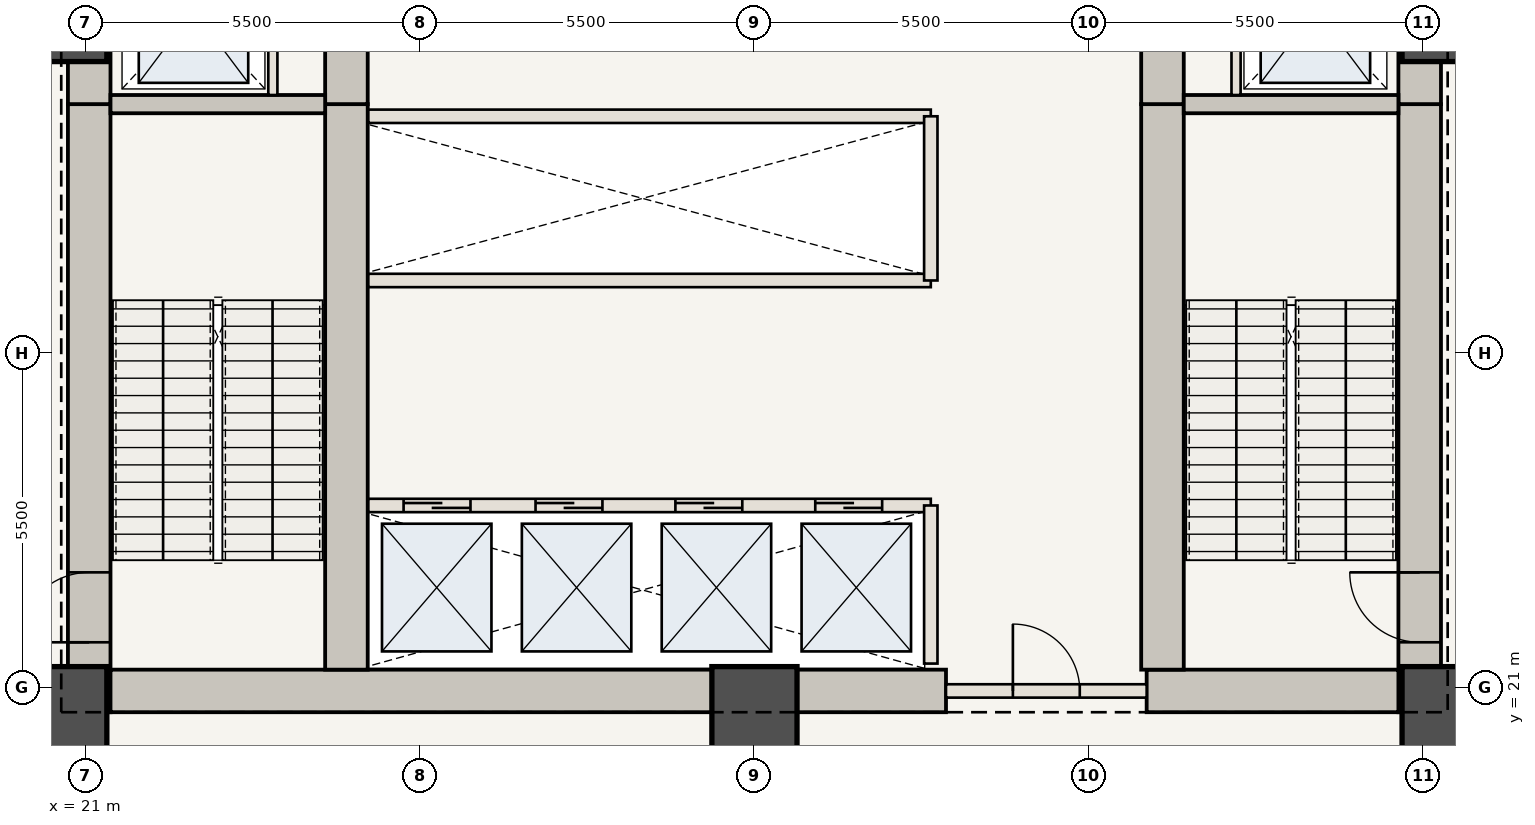
"""IFC4 building model, lengths in metres.
Left out: names, types, materials, properties, quantities, classifications, styles, units other than length and angle.
Written with IfcOpenShell. Run it as: python <this file> out.ifc"""

import sys

from ifc_helpers import new_model, si_unit, direction, frame, frame_2d, origin, origin_2d, place, context, subcontext, project, spatial, rectangle, extrude, element, fill, save


model = new_model("IFC4")
c1 = context("Model", 3, precision=1e-05, world=origin(), true_north=direction((0.0, 1.0)))
c2 = subcontext(c1, "Body", "Model", "MODEL_VIEW")
j1 = project(units=[si_unit("LENGTHUNIT", "METRE"), si_unit("PLANEANGLEUNIT", "RADIAN")], contexts=[c1])
p1 = place(None, origin())
s1 = spatial("IfcSite", under=j1, at=p1, CompositionType="ELEMENT")
p2 = place(p1, origin())
s2 = spatial("IfcBuilding", under=s1, at=p2, CompositionType="ELEMENT")
p3 = place(p2, frame((0.0, 0.0, 6.65)))
s3 = spatial("IfcBuildingStorey", under=s2, at=p3, CompositionType="ELEMENT", Elevation=6.65)
p4 = place(p3, frame((21.06, 20.6, 0.0), z_axis=(0.0, 0.0, 1.0), x_axis=(0.0, 1.0, 0.0)))
e1 = element("IfcWall", 1, at=p4, inside=s3, PredefinedType="SHEAR", context=c2, shape_type="SweptSolid", body=[
    extrude(rectangle(XDim=10.0, YDim=0.7, at=frame_2d((5.0, 0.0))), origin(), (0.0, 0.0, 1.0), 5.6),
])
p5 = place(p4, frame((1.15, 0.0, 0.0)))
e2 = element("IfcOpeningElement", 2, at=p5, cuts=e1, PredefinedType="OPENING", context=c2, shape_type="SweptSolid", body=[
    extrude(rectangle(XDim=1.15, YDim=2.15, at=frame_2d((0.575, 1.075))), frame((0.0, 0.36, 0.0), z_axis=(0.0, -1.0, 0.0), x_axis=(1.0, 0.0, 0.0)), (0.0, 0.0, 1.0), 0.72),
])
p6 = place(p3, frame((21.06, 30.6, 0.0), z_axis=(0.0, 0.0, 1.0), x_axis=(0.0, 1.0, 0.0)))
e3 = element("IfcWall", 3, at=p6, inside=s3, PredefinedType="SHEAR", context=c2, shape_type="SweptSolid", body=[
    extrude(rectangle(XDim=12.75, YDim=0.7, at=frame_2d((6.375, 0.0))), origin(), (0.0, 0.0, 1.0), 5.6),
])
p7 = place(p6, frame((4.2, 0.0, 0.0)))
e4 = element("IfcOpeningElement", 4, at=p7, cuts=e3, PredefinedType="OPENING", context=c2, shape_type="SweptSolid", body=[
    extrude(rectangle(XDim=1.1, YDim=2.15, at=frame_2d((0.55, 1.075))), frame((0.0, 0.36, 0.0), z_axis=(0.0, -1.0, 0.0), x_axis=(1.0, 0.0, 0.0)), (0.0, 0.0, 1.0), 0.72),
])
p8 = place(p6, frame((9.2, 0.0, 0.0)))
e5 = element("IfcOpeningElement", 5, at=p8, cuts=e3, PredefinedType="OPENING", context=c2, shape_type="SweptSolid", body=[
    extrude(rectangle(XDim=0.92, YDim=2.1, at=frame_2d((0.46, 1.05))), frame((0.0, 0.36, 0.0), z_axis=(0.0, -1.0, 0.0), x_axis=(1.0, 0.0, 0.0)), (0.0, 0.0, 1.0), 0.72),
])
p9 = place(p3, frame((42.94, 20.6, 0.0), z_axis=(0.0, 0.0, 1.0), x_axis=(0.0, 1.0, 0.0)))
e6 = element("IfcWall", 6, at=p9, inside=s3, PredefinedType="SHEAR", context=c2, shape_type="SweptSolid", body=[
    extrude(rectangle(XDim=10.0, YDim=0.7, at=frame_2d((5.0, 0.0))), origin(), (0.0, 0.0, 1.0), 5.6),
])
p10 = place(p9, frame((1.15, 0.0, 0.0)))
e7 = element("IfcOpeningElement", 7, at=p10, cuts=e6, PredefinedType="OPENING", context=c2, shape_type="SweptSolid", body=[
    extrude(rectangle(XDim=1.15, YDim=2.15, at=frame_2d((0.575, 1.075))), frame((0.0, 0.36, 0.0), z_axis=(0.0, -1.0, 0.0), x_axis=(1.0, 0.0, 0.0)), (0.0, 0.0, 1.0), 0.72),
])
p11 = place(p3, frame((42.94, 30.6, 0.0), z_axis=(0.0, 0.0, 1.0), x_axis=(0.0, 1.0, 0.0)))
e8 = element("IfcWall", 8, at=p11, inside=s3, PredefinedType="SHEAR", context=c2, shape_type="SweptSolid", body=[
    extrude(rectangle(XDim=12.75, YDim=0.7, at=frame_2d((6.375, 0.0))), origin(), (0.0, 0.0, 1.0), 5.6),
])
p12 = place(p11, frame((4.2, 0.0, 0.0)))
e9 = element("IfcOpeningElement", 9, at=p12, cuts=e8, PredefinedType="OPENING", context=c2, shape_type="SweptSolid", body=[
    extrude(rectangle(XDim=1.1, YDim=2.15, at=frame_2d((0.55, 1.075))), frame((0.0, 0.36, 0.0), z_axis=(0.0, -1.0, 0.0), x_axis=(1.0, 0.0, 0.0)), (0.0, 0.0, 1.0), 0.72),
])
p13 = place(p11, frame((8.4, 0.0, 0.0)))
e10 = element("IfcOpeningElement", 10, at=p13, cuts=e8, PredefinedType="OPENING", context=c2, shape_type="SweptSolid", body=[
    extrude(rectangle(XDim=0.88, YDim=2.1, at=frame_2d((0.44, 1.05))), frame((0.0, 0.36, 0.0), z_axis=(0.0, -1.0, 0.0), x_axis=(1.0, 0.0, 0.0)), (0.0, 0.0, 1.0), 0.72),
])
p14 = place(p11, frame((10.5, 0.0, 0.0)))
e11 = element("IfcOpeningElement", 11, at=p14, cuts=e8, PredefinedType="OPENING", context=c2, shape_type="SweptSolid", body=[
    extrude(rectangle(XDim=0.88, YDim=2.1, at=frame_2d((0.44, 1.05))), frame((0.0, 0.36, 0.0), z_axis=(0.0, -1.0, 0.0), x_axis=(1.0, 0.0, 0.0)), (0.0, 0.0, 1.0), 0.72),
])
p15 = place(p3, frame((21.41, 20.95, 0.0), z_axis=(0.0, 0.0, 1.0), x_axis=(1.0, 0.0, 0.0)))
e12 = element("IfcWall", 12, at=p15, inside=s3, PredefinedType="SHEAR", context=c2, shape_type="SweptSolid", body=[
    extrude(rectangle(XDim=13.74, YDim=0.7, at=frame_2d((6.87, 0.0))), origin(), (0.0, 0.0, 1.0), 5.6),
])
p16 = place(p3, frame((38.45, 20.95, 0.0), z_axis=(0.0, 0.0, 1.0), x_axis=(1.0, 0.0, 0.0)))
e13 = element("IfcWall", 13, at=p16, inside=s3, PredefinedType="SHEAR", context=c2, shape_type="SweptSolid", body=[
    extrude(rectangle(XDim=4.14, YDim=0.7, at=frame_2d((2.07, 0.0))), origin(), (0.0, 0.0, 1.0), 5.6),
])
p17 = place(p3, frame((25.29, 21.3, 0.0), z_axis=(0.0, 0.0, 1.0), x_axis=(0.0, 1.0, 0.0)))
e14 = element("IfcWall", 14, at=p17, inside=s3, PredefinedType="SHEAR", context=c2, shape_type="SweptSolid", body=[
    extrude(rectangle(XDim=9.3, YDim=0.7, at=frame_2d((4.65, 0.0))), origin(), (0.0, 0.0, 1.0), 5.6),
])
p18 = place(p3, frame((25.29, 30.6, 0.0), z_axis=(0.0, 0.0, 1.0), x_axis=(0.0, 1.0, 0.0)))
e15 = element("IfcWall", 15, at=p18, inside=s3, PredefinedType="SHEAR", context=c2, shape_type="SweptSolid", body=[
    extrude(rectangle(XDim=12.05, YDim=0.7, at=frame_2d((6.025, 0.0))), origin(), (0.0, 0.0, 1.0), 5.6),
])
p19 = place(p18, frame((6.25, 0.0, 0.0)))
e16 = element("IfcOpeningElement", 16, at=p19, cuts=e15, PredefinedType="OPENING", context=c2, shape_type="SweptSolid", body=[
    extrude(rectangle(XDim=1.1, YDim=2.15, at=frame_2d((0.55, 1.075))), frame((0.0, 0.36, 0.0), z_axis=(0.0, -1.0, 0.0), x_axis=(1.0, 0.0, 0.0)), (0.0, 0.0, 1.0), 0.72),
])
p20 = place(p3, frame((38.71, 21.3, 0.0), z_axis=(0.0, 0.0, 1.0), x_axis=(0.0, 1.0, 0.0)))
e17 = element("IfcWall", 17, at=p20, inside=s3, PredefinedType="SHEAR", context=c2, shape_type="SweptSolid", body=[
    extrude(rectangle(XDim=9.3, YDim=0.7, at=frame_2d((4.65, 0.0))), origin(), (0.0, 0.0, 1.0), 5.6),
])
p21 = place(p3, frame((38.71, 30.6, 0.0), z_axis=(0.0, 0.0, 1.0), x_axis=(0.0, 1.0, 0.0)))
e18 = element("IfcWall", 18, at=p21, inside=s3, PredefinedType="SHEAR", context=c2, shape_type="SweptSolid", body=[
    extrude(rectangle(XDim=12.05, YDim=0.7, at=frame_2d((6.025, 0.0))), origin(), (0.0, 0.0, 1.0), 5.6),
])
for number, where, z_axis, x_axis in (
    (19, (20.65, 20.65, 0.0), (0.0, 0.0, 1.0), (1.0, 0.0, 0.0)),
    (20, (32.0, 20.65, 0.0), (0.0, 0.0, 1.0), (1.0, 0.0, 0.0)),
    (21, (43.35, 20.65, 0.0), (0.0, 0.0, 1.0), (1.0, 0.0, 0.0)),
    (22, (43.35, 32.0, 0.0), (0.0, 0.0, 1.0), (1.0, 0.0, 0.0)),
    (23, (20.65, 32.0, 0.0), (0.0, 0.0, 1.0), (1.0, 0.0, 0.0)),
):
    element("IfcColumn", number, at=place(p3, frame(where, z_axis=z_axis, x_axis=x_axis)), inside=s3, PredefinedType="COLUMN", context=c2, shape_type="SweptSolid", body=[
        extrude(rectangle(XDim=1.4, YDim=1.4, at=origin_2d()), origin(), (0.0, 0.0, 1.0), 5.6),
    ])
for number, where, z_axis, x_axis in (
    (24, (21.41, 30.6, 0.0), (0.0, 0.0, 1.0), (1.0, 0.0, 0.0)),
    (25, (39.06, 30.6, 0.0), (0.0, 0.0, 1.0), (1.0, 0.0, 0.0)),
):
    element("IfcWall", number, at=place(p3, frame(where, z_axis=z_axis, x_axis=x_axis)), inside=s3, PredefinedType="SHEAR", context=c2, shape_type="SweptSolid", body=[
        extrude(rectangle(XDim=3.53, YDim=0.3, at=frame_2d((1.765, 0.0))), origin(), (0.0, 0.0, 1.0), 5.36),
    ])
for number, where, z_axis, x_axis in (
    (26, (24.08, 30.75, 0.0), (0.0, 0.0, 1.0), (0.0, 1.0, 0.0)),
    (27, (39.92, 30.75, 0.0), (0.0, 0.0, 1.0), (0.0, 1.0, 0.0)),
):
    element("IfcWall", number, at=place(p3, frame(where, z_axis=z_axis, x_axis=x_axis)), inside=s3, PredefinedType="STANDARD", context=c2, shape_type="SweptSolid", body=[
        extrude(rectangle(XDim=2.65, YDim=0.15, at=frame_2d((1.325, 0.0))), origin(), (0.0, 0.0, 1.0), 5.36),
    ])
p22 = place(p3, frame((35.15, 20.95, 0.0), z_axis=(0.0, 0.0, 1.0), x_axis=(1.0, 0.0, 0.0)))
e28 = element("IfcWall", 28, at=p22, inside=s3, PredefinedType="STANDARD", context=c2, shape_type="SweptSolid", body=[
    extrude(rectangle(XDim=3.3, YDim=0.22, at=frame_2d((1.65, 0.0))), origin(), (0.0, 0.0, 1.0), 5.36),
])
p23 = place(p22, frame((1.1, 0.0, 0.0)))
e29 = element("IfcOpeningElement", 29, at=p23, cuts=e28, PredefinedType="OPENING", context=c2, shape_type="SweptSolid", body=[
    extrude(rectangle(XDim=1.1, YDim=2.15, at=frame_2d((0.55, 1.075))), frame((0.0, 0.12, 0.0), z_axis=(0.0, -1.0, 0.0), x_axis=(1.0, 0.0, 0.0)), (0.0, 0.0, 1.0), 0.24),
])
p24 = place(p3, frame((25.65, 24.0, 0.0), z_axis=(0.0, 0.0, 1.0), x_axis=(1.0, 0.0, 0.0)))
e30 = element("IfcWall", 30, at=p24, inside=s3, PredefinedType="STANDARD", context=c2, shape_type="SweptSolid", body=[
    extrude(rectangle(XDim=9.25, YDim=0.22, at=frame_2d((4.625, 0.0))), origin(), (0.0, 0.0, 1.0), 5.36),
])
p25 = place(p24, frame((0.58, 0.0, 0.0)))
e31 = element("IfcOpeningElement", 31, at=p25, cuts=e30, PredefinedType="OPENING", context=c2, shape_type="SweptSolid", body=[
    extrude(rectangle(XDim=1.1, YDim=2.15, at=frame_2d((0.55, 1.075))), frame((0.0, 0.12, 0.0), z_axis=(0.0, -1.0, 0.0), x_axis=(1.0, 0.0, 0.0)), (0.0, 0.0, 1.0), 0.24),
])
p26 = place(p24, frame((2.75, 0.0, 0.0)))
e32 = element("IfcOpeningElement", 32, at=p26, cuts=e30, PredefinedType="OPENING", context=c2, shape_type="SweptSolid", body=[
    extrude(rectangle(XDim=1.1, YDim=2.15, at=frame_2d((0.55, 1.075))), frame((0.0, 0.12, 0.0), z_axis=(0.0, -1.0, 0.0), x_axis=(1.0, 0.0, 0.0)), (0.0, 0.0, 1.0), 0.24),
])
p27 = place(p24, frame((5.05, 0.0, 0.0)))
e33 = element("IfcOpeningElement", 33, at=p27, cuts=e30, PredefinedType="OPENING", context=c2, shape_type="SweptSolid", body=[
    extrude(rectangle(XDim=1.1, YDim=2.15, at=frame_2d((0.55, 1.075))), frame((0.0, 0.12, 0.0), z_axis=(0.0, -1.0, 0.0), x_axis=(1.0, 0.0, 0.0)), (0.0, 0.0, 1.0), 0.24),
])
p28 = place(p24, frame((7.35, 0.0, 0.0)))
e34 = element("IfcOpeningElement", 34, at=p28, cuts=e30, PredefinedType="OPENING", context=c2, shape_type="SweptSolid", body=[
    extrude(rectangle(XDim=1.1, YDim=2.15, at=frame_2d((0.55, 1.075))), frame((0.0, 0.12, 0.0), z_axis=(0.0, -1.0, 0.0), x_axis=(1.0, 0.0, 0.0)), (0.0, 0.0, 1.0), 0.24),
])
p29 = place(p3, frame((34.9, 21.4, 0.0), z_axis=(0.0, 0.0, 1.0), x_axis=(0.0, 1.0, 0.0)))
e35 = element("IfcWall", 35, at=p29, inside=s3, PredefinedType="STANDARD", context=c2, shape_type="SweptSolid", body=[
    extrude(rectangle(XDim=2.6, YDim=0.22, at=frame_2d((1.3, 0.0))), origin(), (0.0, 0.0, 1.0), 5.36),
])
for number, where, z_axis, x_axis in (
    (36, (25.65, 27.7, 0.0), (0.0, 0.0, 1.0), (1.0, 0.0, 0.0)),
    (37, (25.65, 30.4, 0.0), (0.0, 0.0, 1.0), (1.0, 0.0, 0.0)),
):
    element("IfcWall", number, at=place(p3, frame(where, z_axis=z_axis, x_axis=x_axis)), inside=s3, PredefinedType="STANDARD", context=c2, shape_type="SweptSolid", body=[
        extrude(rectangle(XDim=9.25, YDim=0.22, at=frame_2d((4.625, 0.0))), origin(), (0.0, 0.0, 1.0), 5.36),
    ])
p30 = place(p3, frame((34.9, 27.7, 0.0), z_axis=(0.0, 0.0, 1.0), x_axis=(0.0, 1.0, 0.0)))
e38 = element("IfcWall", 38, at=p30, inside=s3, PredefinedType="STANDARD", context=c2, shape_type="SweptSolid", body=[
    extrude(rectangle(XDim=2.7, YDim=0.22, at=frame_2d((1.35, 0.0))), origin(), (0.0, 0.0, 1.0), 5.36),
])
p31 = place(p5, origin())
e39 = element("IfcDoor", 39, at=p31, inside=s3, OperationType="SINGLE_SWING_LEFT", PredefinedType="DOOR", context=c2, shape_type="SweptSolid", body=[
    extrude(rectangle(XDim=1.15, YDim=2.15, at=frame_2d((0.575, 1.075))), frame((0.0, 0.025, 0.0), z_axis=(0.0, -1.0, 0.0), x_axis=(1.0, 0.0, 0.0)), (0.0, 0.0, 1.0), 0.05),
])
fill(e2, e39)
p32 = place(p10, origin())
e40 = element("IfcDoor", 40, at=p32, inside=s3, OperationType="SINGLE_SWING_RIGHT", PredefinedType="DOOR", context=c2, shape_type="SweptSolid", body=[
    extrude(rectangle(XDim=1.15, YDim=2.15, at=frame_2d((0.575, 1.075))), frame((0.0, 0.025, 0.0), z_axis=(0.0, -1.0, 0.0), x_axis=(1.0, 0.0, 0.0)), (0.0, 0.0, 1.0), 0.05),
])
fill(e7, e40)
p33 = place(p23, origin())
e41 = element("IfcDoor", 41, at=p33, inside=s3, OperationType="SINGLE_SWING_LEFT", PredefinedType="DOOR", context=c2, shape_type="SweptSolid", body=[
    extrude(rectangle(XDim=1.1, YDim=2.15, at=frame_2d((0.55, 1.075))), frame((0.0, 0.025, 0.0), z_axis=(0.0, -1.0, 0.0), x_axis=(1.0, 0.0, 0.0)), (0.0, 0.0, 1.0), 0.05),
])
fill(e29, e41)
p34 = place(p25, origin())
e42 = element("IfcDoor", 42, at=p34, inside=s3, OperationType="DOUBLE_DOOR_SLIDING", PredefinedType="DOOR", context=c2, shape_type="SweptSolid", body=[
    extrude(rectangle(XDim=1.1, YDim=2.15, at=frame_2d((0.55, 1.075))), frame((0.0, 0.025, 0.0), z_axis=(0.0, -1.0, 0.0), x_axis=(1.0, 0.0, 0.0)), (0.0, 0.0, 1.0), 0.05),
])
fill(e31, e42)
p35 = place(p26, origin())
e43 = element("IfcDoor", 43, at=p35, inside=s3, OperationType="DOUBLE_DOOR_SLIDING", PredefinedType="DOOR", context=c2, shape_type="SweptSolid", body=[
    extrude(rectangle(XDim=1.1, YDim=2.15, at=frame_2d((0.55, 1.075))), frame((0.0, 0.025, 0.0), z_axis=(0.0, -1.0, 0.0), x_axis=(1.0, 0.0, 0.0)), (0.0, 0.0, 1.0), 0.05),
])
fill(e32, e43)
p36 = place(p27, origin())
e44 = element("IfcDoor", 44, at=p36, inside=s3, OperationType="DOUBLE_DOOR_SLIDING", PredefinedType="DOOR", context=c2, shape_type="SweptSolid", body=[
    extrude(rectangle(XDim=1.1, YDim=2.15, at=frame_2d((0.55, 1.075))), frame((0.0, 0.025, 0.0), z_axis=(0.0, -1.0, 0.0), x_axis=(1.0, 0.0, 0.0)), (0.0, 0.0, 1.0), 0.05),
])
fill(e33, e44)
p37 = place(p28, origin())
e45 = element("IfcDoor", 45, at=p37, inside=s3, OperationType="DOUBLE_DOOR_SLIDING", PredefinedType="DOOR", context=c2, shape_type="SweptSolid", body=[
    extrude(rectangle(XDim=1.1, YDim=2.15, at=frame_2d((0.55, 1.075))), frame((0.0, 0.025, 0.0), z_axis=(0.0, -1.0, 0.0), x_axis=(1.0, 0.0, 0.0)), (0.0, 0.0, 1.0), 0.05),
])
fill(e34, e45)
save(model, sys.argv[1])
